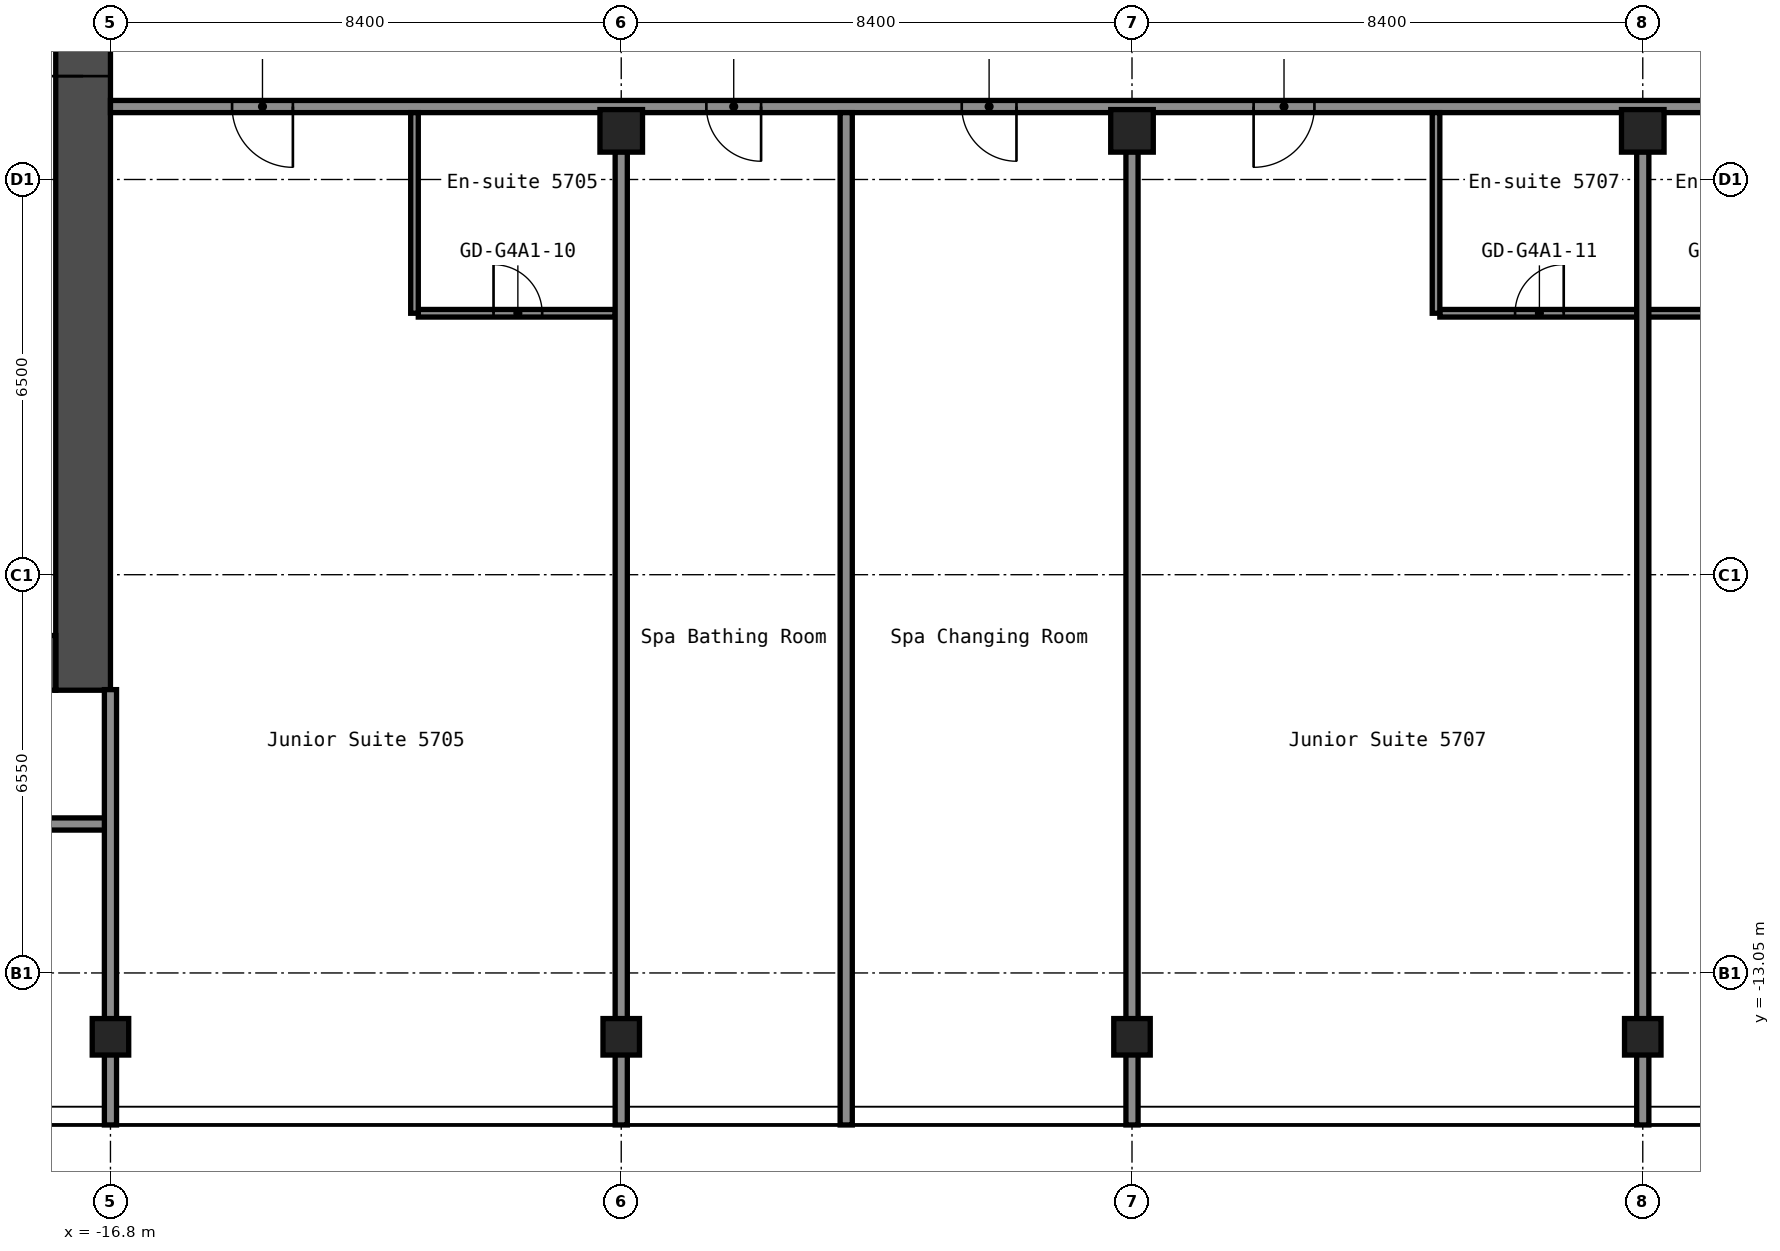
"""IFC4 building model, lengths in metres.
Left out: names, types, materials, properties, quantities, classifications, styles, units other than length and angle.
Written with IfcOpenShell. Run it as: python <this file> out.ifc"""

import sys

from ifc_helpers import new_model, si_unit, direction, frame, frame_2d, origin, origin_2d, place, context, subcontext, project, spatial, rectangle, hollow_rectangle, extrude, element, fill, save


model = new_model("IFC4")
c1 = context("Model", 3, precision=1e-05, world=origin(), true_north=direction((0.0, 1.0)))
c2 = subcontext(c1, "Body", "Model", "MODEL_VIEW")
j1 = project(units=[si_unit("LENGTHUNIT", "METRE"), si_unit("PLANEANGLEUNIT", "RADIAN")], contexts=[c1])
p1 = place(None, origin())
s1 = spatial("IfcSite", under=j1, at=p1, CompositionType="ELEMENT")
p2 = place(p1, origin())
s2 = spatial("IfcBuilding", under=s1, at=p2, CompositionType="ELEMENT")
p3 = place(p2, frame((0.0, 0.0, 202.6)))
s3 = spatial("IfcBuildingStorey", under=s2, at=p3, CompositionType="ELEMENT", Elevation=202.6)
for number, where, z_axis, x_axis in (
    (1, (-16.8, -14.1, 0.0), (0.0, 0.0, 1.0), (1.0, 0.0, 0.0)),
    (2, (-8.4, -14.1, 0.0), (0.0, 0.0, 1.0), (1.0, 0.0, 0.0)),
):
    element("IfcColumn", number, at=place(p3, frame(where, z_axis=z_axis, x_axis=x_axis)), inside=s3, PredefinedType="COLUMN", context=c2, shape_type="SweptSolid", body=[
        extrude(hollow_rectangle(XDim=0.6, YDim=0.6, WallThickness=0.025, InnerFilletRadius=0.038, OuterFilletRadius=0.062, at=origin_2d()), origin(), (0.0, 0.0, 1.0), 2.75),
    ])
p4 = place(p3, frame((-8.4, 0.8, 0.0), z_axis=(0.0, 0.0, 1.0), x_axis=(1.0, 0.0, 0.0)))
e3 = element("IfcColumn", 3, at=p4, inside=s3, PredefinedType="COLUMN", context=c2, shape_type="SweptSolid", body=[
    extrude(hollow_rectangle(XDim=0.7, YDim=0.7, WallThickness=0.028, at=origin_2d()), origin(), (0.0, 0.0, 1.0), 2.75),
])
p5 = place(p3, frame((0.0, -14.1, 0.0), z_axis=(0.0, 0.0, 1.0), x_axis=(1.0, 0.0, 0.0)))
e4 = element("IfcColumn", 4, at=p5, inside=s3, PredefinedType="COLUMN", context=c2, shape_type="SweptSolid", body=[
    extrude(hollow_rectangle(XDim=0.6, YDim=0.6, WallThickness=0.025, InnerFilletRadius=0.038, OuterFilletRadius=0.062, at=origin_2d()), origin(), (0.0, 0.0, 1.0), 2.75),
])
p6 = place(p3, frame((0.0, 0.8, 0.0), z_axis=(0.0, 0.0, 1.0), x_axis=(1.0, 0.0, 0.0)))
e5 = element("IfcColumn", 5, at=p6, inside=s3, PredefinedType="COLUMN", context=c2, shape_type="SweptSolid", body=[
    extrude(hollow_rectangle(XDim=0.7, YDim=0.7, WallThickness=0.028, at=origin_2d()), origin(), (0.0, 0.0, 1.0), 2.75),
])
p7 = place(p3, frame((8.4, -14.1, 0.0), z_axis=(0.0, 0.0, 1.0), x_axis=(1.0, 0.0, 0.0)))
e6 = element("IfcColumn", 6, at=p7, inside=s3, PredefinedType="COLUMN", context=c2, shape_type="SweptSolid", body=[
    extrude(hollow_rectangle(XDim=0.6, YDim=0.6, WallThickness=0.025, InnerFilletRadius=0.038, OuterFilletRadius=0.062, at=origin_2d()), origin(), (0.0, 0.0, 1.0), 2.75),
])
p8 = place(p3, frame((8.4, 0.8, 0.0), z_axis=(0.0, 0.0, 1.0), x_axis=(1.0, 0.0, 0.0)))
e7 = element("IfcColumn", 7, at=p8, inside=s3, PredefinedType="COLUMN", context=c2, shape_type="SweptSolid", body=[
    extrude(hollow_rectangle(XDim=0.7, YDim=0.7, WallThickness=0.028, at=origin_2d()), origin(), (0.0, 0.0, 1.0), 2.75),
])
p9 = place(p3, frame((-17.25, -8.4, 0.0), z_axis=(0.0, 0.0, 1.0), x_axis=(0.0, 1.0, 0.0)))
e8 = element("IfcWall", 8, at=p9, inside=s3, PredefinedType="SHEAR", context=c2, shape_type="SweptSolid", body=[
    extrude(rectangle(XDim=16.8, YDim=0.9, at=frame_2d((8.4, 0.0))), origin(), (0.0, 0.0, 1.0), 2.75),
])
p10 = place(p9, frame((10.1, 0.0, 0.0)))
e9 = element("IfcOpeningElement", 9, at=p10, cuts=e8, PredefinedType="OPENING", context=c2, shape_type="SweptSolid", body=[
    extrude(rectangle(XDim=1.6, YDim=2.1, at=frame_2d((0.8, 1.05))), frame((0.0, 0.46, 0.0), z_axis=(0.0, -1.0, 0.0), x_axis=(1.0, 0.0, 0.0)), (0.0, 0.0, 1.0), 0.92),
])
p11 = place(p3, frame((-32.7, -7.95, 0.0), z_axis=(0.0, 0.0, 1.0), x_axis=(1.0, 0.0, 0.0)))
e10 = element("IfcWall", 10, at=p11, inside=s3, PredefinedType="SHEAR", context=c2, shape_type="SweptSolid", body=[
    extrude(rectangle(XDim=15.0, YDim=0.9, at=frame_2d((7.5, 0.0))), origin(), (0.0, 0.0, 1.0), 2.75),
])
p12 = place(p11, frame((11.45, 0.0, 0.0)))
e11 = element("IfcOpeningElement", 11, at=p12, cuts=e10, PredefinedType="OPENING", context=c2, shape_type="SweptSolid", body=[
    extrude(rectangle(XDim=1.0, YDim=2.1, at=frame_2d((0.5, 1.05))), frame((0.0, 0.46, 0.0), z_axis=(0.0, -1.0, 0.0), x_axis=(1.0, 0.0, 0.0)), (0.0, 0.0, 1.0), 0.92),
])
p13 = place(p3, frame((-38.1, -10.6, 0.0), z_axis=(0.0, 0.0, 1.0), x_axis=(1.0, 0.0, 0.0)))
e12 = element("IfcWall", 12, at=p13, inside=s3, PredefinedType="PARTITIONING", context=c2, shape_type="SweptSolid", body=[
    extrude(rectangle(XDim=21.3, YDim=0.2, at=frame_2d((10.65, 0.0))), origin(), (0.0, 0.0, 1.0), 2.75),
])
p14 = place(p13, frame((1.95, 0.0, 0.0)))
e13 = element("IfcOpeningElement", 13, at=p14, cuts=e12, PredefinedType="OPENING", context=c2, shape_type="SweptSolid", body=[
    extrude(rectangle(XDim=0.9, YDim=2.1, at=frame_2d((0.45, 1.05))), frame((0.0, 0.11, 0.0), z_axis=(0.0, -1.0, 0.0), x_axis=(1.0, 0.0, 0.0)), (0.0, 0.0, 1.0), 0.22),
])
p15 = place(p13, frame((5.815, 0.0, 0.0)))
e14 = element("IfcOpeningElement", 14, at=p15, cuts=e12, PredefinedType="OPENING", context=c2, shape_type="SweptSolid", body=[
    extrude(rectangle(XDim=0.9, YDim=2.1, at=frame_2d((0.45, 1.05))), frame((0.0, 0.11, 0.0), z_axis=(0.0, -1.0, 0.0), x_axis=(1.0, 0.0, 0.0)), (0.0, 0.0, 1.0), 0.22),
])
p16 = place(p13, frame((10.015, 0.0, 0.0)))
e15 = element("IfcOpeningElement", 15, at=p16, cuts=e12, PredefinedType="OPENING", context=c2, shape_type="SweptSolid", body=[
    extrude(rectangle(XDim=0.9, YDim=2.1, at=frame_2d((0.45, 1.05))), frame((0.0, 0.11, 0.0), z_axis=(0.0, -1.0, 0.0), x_axis=(1.0, 0.0, 0.0)), (0.0, 0.0, 1.0), 0.22),
])
p17 = place(p13, frame((14.13, 0.0, 0.0)))
e16 = element("IfcOpeningElement", 16, at=p17, cuts=e12, PredefinedType="OPENING", context=c2, shape_type="SweptSolid", body=[
    extrude(rectangle(XDim=0.9, YDim=2.1, at=frame_2d((0.45, 1.05))), frame((0.0, 0.11, 0.0), z_axis=(0.0, -1.0, 0.0), x_axis=(1.0, 0.0, 0.0)), (0.0, 0.0, 1.0), 0.22),
])
p18 = place(p13, frame((18.33, 0.0, 0.0)))
e17 = element("IfcOpeningElement", 17, at=p18, cuts=e12, PredefinedType="OPENING", context=c2, shape_type="SweptSolid", body=[
    extrude(rectangle(XDim=0.9, YDim=2.1, at=frame_2d((0.45, 1.05))), frame((0.0, 0.11, 0.0), z_axis=(0.0, -1.0, 0.0), x_axis=(1.0, 0.0, 0.0)), (0.0, 0.0, 1.0), 0.22),
])
p19 = place(p3, frame((-11.738, -2.2, 0.0), z_axis=(0.0, 0.0, 1.0), x_axis=(1.0, 0.0, 0.0)))
e18 = element("IfcWall", 18, at=p19, inside=s3, PredefinedType="PARTITIONING", context=c2, shape_type="SweptSolid", body=[
    extrude(rectangle(XDim=3.238, YDim=0.125, at=frame_2d((1.619, 0.0))), origin(), (0.0, 0.0, 1.0), 2.75),
])
p20 = place(p19, frame((1.238, 0.0, 0.0)))
e19 = element("IfcOpeningElement", 19, at=p20, cuts=e18, PredefinedType="OPENING", context=c2, shape_type="SweptSolid", body=[
    extrude(rectangle(XDim=0.8, YDim=2.1, at=frame_2d((0.4, 1.05))), frame((0.0, 0.073, 0.0), z_axis=(0.0, -1.0, 0.0), x_axis=(1.0, 0.0, 0.0)), (0.0, 0.0, 1.0), 0.145),
])
p21 = place(p3, frame((5.062, -2.2, 0.0), z_axis=(0.0, 0.0, 1.0), x_axis=(1.0, 0.0, 0.0)))
e20 = element("IfcWall", 20, at=p21, inside=s3, PredefinedType="PARTITIONING", context=c2, shape_type="SweptSolid", body=[
    extrude(rectangle(XDim=6.675, YDim=0.125, at=frame_2d((3.337, 0.0))), origin(), (0.0, 0.0, 1.0), 2.75),
])
p22 = place(p21, frame((1.238, 0.0, 0.0)))
e21 = element("IfcOpeningElement", 21, at=p22, cuts=e20, PredefinedType="OPENING", context=c2, shape_type="SweptSolid", body=[
    extrude(rectangle(XDim=0.8, YDim=2.1, at=frame_2d((0.4, 1.05))), frame((0.0, 0.073, 0.0), z_axis=(0.0, -1.0, 0.0), x_axis=(1.0, 0.0, 0.0)), (0.0, 0.0, 1.0), 0.145),
])
p23 = place(p21, frame((4.637, 0.0, 0.0)))
e22 = element("IfcOpeningElement", 22, at=p23, cuts=e20, PredefinedType="OPENING", context=c2, shape_type="SweptSolid", body=[
    extrude(rectangle(XDim=0.8, YDim=2.1, at=frame_2d((0.4, 1.05))), frame((0.0, 0.073, 0.0), z_axis=(0.0, -1.0, 0.0), x_axis=(1.0, 0.0, 0.0)), (0.0, 0.0, 1.0), 0.145),
])
p24 = place(p3, frame((-16.8, 1.2, 0.0), z_axis=(0.0, 0.0, 1.0), x_axis=(1.0, 0.0, 0.0)))
e23 = element("IfcWall", 23, at=p24, inside=s3, PredefinedType="PARTITIONING", context=c2, shape_type="SweptSolid", body=[
    extrude(rectangle(XDim=33.6, YDim=0.2, at=frame_2d((16.8, 0.0))), origin(), (0.0, 0.0, 1.0), 2.75),
])
p25 = place(p24, frame((2.0, 0.0, 0.0)))
e24 = element("IfcOpeningElement", 24, at=p25, cuts=e23, PredefinedType="OPENING", context=c2, shape_type="SweptSolid", body=[
    extrude(rectangle(XDim=1.0, YDim=2.1, at=frame_2d((0.5, 1.05))), frame((0.0, 0.11, 0.0), z_axis=(0.0, -1.0, 0.0), x_axis=(1.0, 0.0, 0.0)), (0.0, 0.0, 1.0), 0.22),
])
p26 = place(p24, frame((9.8, 0.0, 0.0)))
e25 = element("IfcOpeningElement", 25, at=p26, cuts=e23, PredefinedType="OPENING", context=c2, shape_type="SweptSolid", body=[
    extrude(rectangle(XDim=0.9, YDim=2.1, at=frame_2d((0.45, 1.05))), frame((0.0, 0.11, 0.0), z_axis=(0.0, -1.0, 0.0), x_axis=(1.0, 0.0, 0.0)), (0.0, 0.0, 1.0), 0.22),
])
p27 = place(p24, frame((14.0, 0.0, 0.0)))
e26 = element("IfcOpeningElement", 26, at=p27, cuts=e23, PredefinedType="OPENING", context=c2, shape_type="SweptSolid", body=[
    extrude(rectangle(XDim=0.9, YDim=2.1, at=frame_2d((0.45, 1.05))), frame((0.0, 0.11, 0.0), z_axis=(0.0, -1.0, 0.0), x_axis=(1.0, 0.0, 0.0)), (0.0, 0.0, 1.0), 0.22),
])
p28 = place(p24, frame((18.8, 0.0, 0.0)))
e27 = element("IfcOpeningElement", 27, at=p28, cuts=e23, PredefinedType="OPENING", context=c2, shape_type="SweptSolid", body=[
    extrude(rectangle(XDim=1.0, YDim=2.1, at=frame_2d((0.5, 1.05))), frame((0.0, 0.11, 0.0), z_axis=(0.0, -1.0, 0.0), x_axis=(1.0, 0.0, 0.0)), (0.0, 0.0, 1.0), 0.22),
])
p29 = place(p24, frame((30.6, 0.0, 0.0)))
e28 = element("IfcOpeningElement", 28, at=p29, cuts=e23, PredefinedType="OPENING", context=c2, shape_type="SweptSolid", body=[
    extrude(rectangle(XDim=1.0, YDim=2.1, at=frame_2d((0.5, 1.05))), frame((0.0, 0.11, 0.0), z_axis=(0.0, -1.0, 0.0), x_axis=(1.0, 0.0, 0.0)), (0.0, 0.0, 1.0), 0.22),
])
p30 = place(p3, frame((-16.8, -15.55, 0.0), z_axis=(0.0, 0.0, 1.0), x_axis=(0.0, 1.0, 0.0)))
e29 = element("IfcWall", 29, at=p30, inside=s3, PredefinedType="PARTITIONING", context=c2, shape_type="SweptSolid", body=[
    extrude(rectangle(XDim=7.16, YDim=0.2, at=frame_2d((3.58, 0.0))), origin(), (0.0, 0.0, 1.0), 2.75),
])
p31 = place(p3, frame((-11.8, -2.2, 0.0), z_axis=(0.0, 0.0, 1.0), x_axis=(0.0, 1.0, 0.0)))
e30 = element("IfcWall", 30, at=p31, inside=s3, PredefinedType="PARTITIONING", context=c2, shape_type="SweptSolid", body=[
    extrude(rectangle(XDim=3.3, YDim=0.125, at=frame_2d((1.65, 0.0))), origin(), (0.0, 0.0, 1.0), 2.75),
])
p32 = place(p3, frame((-8.4, -15.55, 0.0), z_axis=(0.0, 0.0, 1.0), x_axis=(0.0, 1.0, 0.0)))
e31 = element("IfcWall", 31, at=p32, inside=s3, PredefinedType="PARTITIONING", context=c2, shape_type="SweptSolid", body=[
    extrude(rectangle(XDim=16.01, YDim=0.2, at=frame_2d((8.005, 0.0))), origin(), (0.0, 0.0, 1.0), 2.75),
])
p33 = place(p3, frame((-4.7, -15.55, 0.0), z_axis=(0.0, 0.0, 1.0), x_axis=(0.0, 1.0, 0.0)))
e32 = element("IfcWall", 32, at=p33, inside=s3, PredefinedType="PARTITIONING", context=c2, shape_type="SweptSolid", body=[
    extrude(rectangle(XDim=16.65, YDim=0.2, at=frame_2d((8.325, 0.0))), origin(), (0.0, 0.0, 1.0), 2.75),
])
p34 = place(p3, frame((0.0, -15.55, 0.0), z_axis=(0.0, 0.0, 1.0), x_axis=(0.0, 1.0, 0.0)))
e33 = element("IfcWall", 33, at=p34, inside=s3, PredefinedType="PARTITIONING", context=c2, shape_type="SweptSolid", body=[
    extrude(rectangle(XDim=16.01, YDim=0.2, at=frame_2d((8.005, 0.0))), origin(), (0.0, 0.0, 1.0), 2.75),
])
p35 = place(p3, frame((5.0, -2.2, 0.0), z_axis=(0.0, 0.0, 1.0), x_axis=(0.0, 1.0, 0.0)))
e34 = element("IfcWall", 34, at=p35, inside=s3, PredefinedType="PARTITIONING", context=c2, shape_type="SweptSolid", body=[
    extrude(rectangle(XDim=3.3, YDim=0.125, at=frame_2d((1.65, 0.0))), origin(), (0.0, 0.0, 1.0), 2.75),
])
p36 = place(p3, frame((8.4, -15.55, 0.0), z_axis=(0.0, 0.0, 1.0), x_axis=(0.0, 1.0, 0.0)))
e35 = element("IfcWall", 35, at=p36, inside=s3, PredefinedType="PARTITIONING", context=c2, shape_type="SweptSolid", body=[
    extrude(rectangle(XDim=16.01, YDim=0.2, at=frame_2d((8.005, 0.0))), origin(), (0.0, 0.0, 1.0), 2.75),
])
p37 = place(p10, origin())
e36 = element("IfcDoor", 36, at=p37, inside=s3, OperationType="DOUBLE_DOOR_SINGLE_SWING", PredefinedType="DOOR", context=c2, shape_type="SweptSolid", body=[
    extrude(rectangle(XDim=1.6, YDim=2.1, at=frame_2d((0.8, 1.05))), frame((0.0, 0.025, 0.0), z_axis=(0.0, -1.0, 0.0), x_axis=(1.0, 0.0, 0.0)), (0.0, 0.0, 1.0), 0.05),
])
fill(e9, e36)
p38 = place(p20, origin())
e37 = element("IfcDoor", 37, at=p38, inside=s3, OperationType="SINGLE_SWING_RIGHT", PredefinedType="DOOR", context=c2, shape_type="SweptSolid", body=[
    extrude(rectangle(XDim=0.8, YDim=2.1, at=frame_2d((0.4, 1.05))), frame((0.0, 0.025, 0.0), z_axis=(0.0, -1.0, 0.0), x_axis=(1.0, 0.0, 0.0)), (0.0, 0.0, 1.0), 0.05),
])
fill(e19, e37)
p39 = place(p22, origin())
e38 = element("IfcDoor", 38, at=p39, inside=s3, OperationType="SINGLE_SWING_LEFT", PredefinedType="DOOR", context=c2, shape_type="SweptSolid", body=[
    extrude(rectangle(XDim=0.8, YDim=2.1, at=frame_2d((0.4, 1.05))), frame((0.0, 0.025, 0.0), z_axis=(0.0, -1.0, 0.0), x_axis=(1.0, 0.0, 0.0)), (0.0, 0.0, 1.0), 0.05),
])
fill(e21, e38)
p40 = place(p25, origin())
e39 = element("IfcDoor", 39, at=p40, inside=s3, OperationType="SINGLE_SWING_RIGHT", PredefinedType="DOOR", context=c2, shape_type="SweptSolid", body=[
    extrude(rectangle(XDim=1.0, YDim=2.1, at=frame_2d((0.5, 1.05))), frame((0.0, 0.025, 0.0), z_axis=(0.0, -1.0, 0.0), x_axis=(1.0, 0.0, 0.0)), (0.0, 0.0, 1.0), 0.05),
])
fill(e24, e39)
p41 = place(p26, origin())
e40 = element("IfcDoor", 40, at=p41, inside=s3, OperationType="SINGLE_SWING_RIGHT", PredefinedType="DOOR", context=c2, shape_type="SweptSolid", body=[
    extrude(rectangle(XDim=0.9, YDim=2.1, at=frame_2d((0.45, 1.05))), frame((0.0, 0.025, 0.0), z_axis=(0.0, -1.0, 0.0), x_axis=(1.0, 0.0, 0.0)), (0.0, 0.0, 1.0), 0.05),
])
fill(e25, e40)
p42 = place(p27, origin())
e41 = element("IfcDoor", 41, at=p42, inside=s3, OperationType="SINGLE_SWING_RIGHT", PredefinedType="DOOR", context=c2, shape_type="SweptSolid", body=[
    extrude(rectangle(XDim=0.9, YDim=2.1, at=frame_2d((0.45, 1.05))), frame((0.0, 0.025, 0.0), z_axis=(0.0, -1.0, 0.0), x_axis=(1.0, 0.0, 0.0)), (0.0, 0.0, 1.0), 0.05),
])
fill(e26, e41)
p43 = place(p28, origin())
e42 = element("IfcDoor", 42, at=p43, inside=s3, OperationType="SINGLE_SWING_LEFT", PredefinedType="DOOR", context=c2, shape_type="SweptSolid", body=[
    extrude(rectangle(XDim=1.0, YDim=2.1, at=frame_2d((0.5, 1.05))), frame((0.0, 0.025, 0.0), z_axis=(0.0, -1.0, 0.0), x_axis=(1.0, 0.0, 0.0)), (0.0, 0.0, 1.0), 0.05),
])
fill(e27, e42)
save(model, sys.argv[1])
